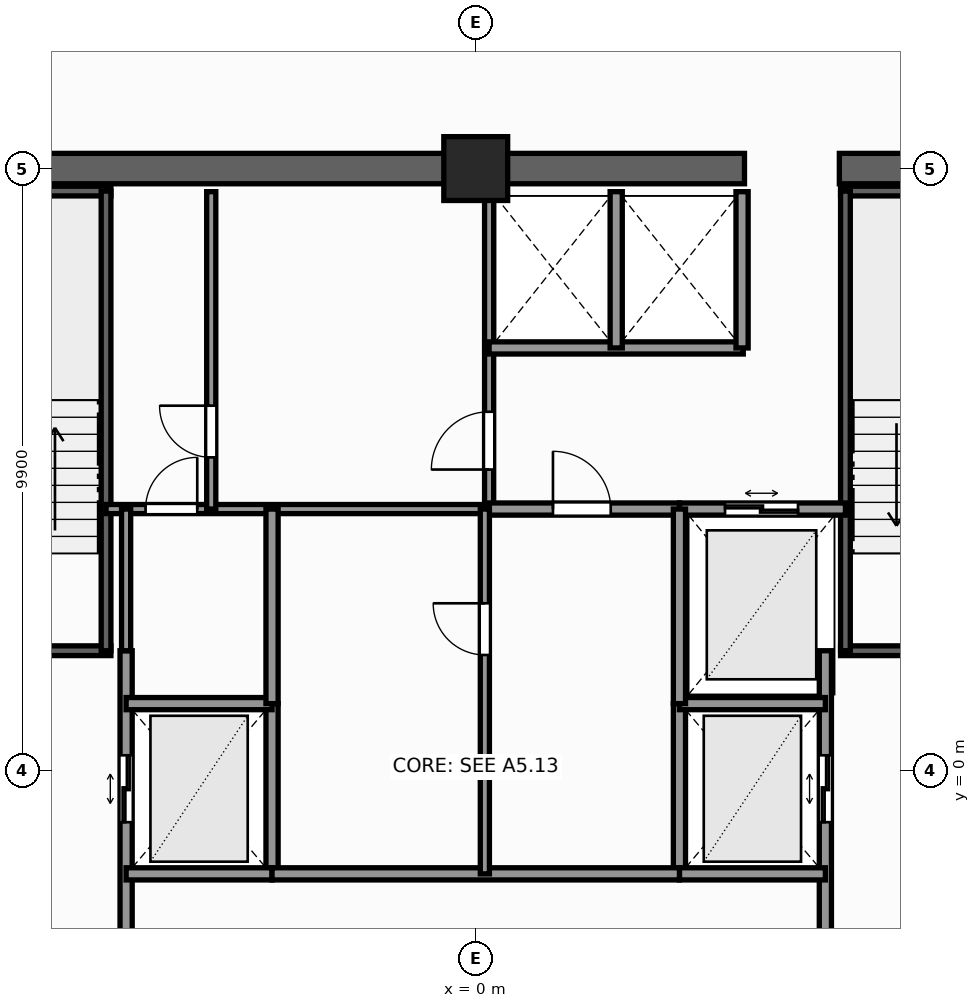
"""IFC4 building model, lengths in metres.
Left out: names, types, materials, properties, quantities, classifications, styles, units other than length and angle.
Written with IfcOpenShell. Run it as: python <this file> out.ifc"""

import sys

from ifc_helpers import new_model, si_unit, direction, frame, frame_2d, origin, origin_2d, place, context, subcontext, project, spatial, rectangle, extrude, element, fill, save


model = new_model("IFC4")
c1 = context("Model", 3, precision=1e-05, world=origin(), true_north=direction((0.0, 1.0)))
c2 = subcontext(c1, "Body", "Model", "MODEL_VIEW")
j1 = project(units=[si_unit("LENGTHUNIT", "METRE"), si_unit("PLANEANGLEUNIT", "RADIAN")], contexts=[c1])
p1 = place(None, origin())
s1 = spatial("IfcSite", under=j1, at=p1, CompositionType="ELEMENT")
p2 = place(p1, origin())
s2 = spatial("IfcBuilding", under=s1, at=p2, CompositionType="ELEMENT")
p3 = place(p2, frame((0.0, 0.0, 196.5)))
s3 = spatial("IfcBuildingStorey", under=s2, at=p3, CompositionType="ELEMENT", Elevation=196.5)
p4 = place(p3, frame((-10.15, 9.9, 0.0), z_axis=(0.0, 0.0, 1.0), x_axis=(1.0, 0.0, 0.0)))
e1 = element("IfcWall", 1, at=p4, inside=s3, PredefinedType="SHEAR", context=c2, shape_type="SweptSolid", body=[
    extrude(rectangle(XDim=14.57, YDim=0.5, at=frame_2d((7.285, 0.0))), origin(), (0.0, 0.0, 1.0), 3.3),
])
p5 = place(p3, frame((5.98, 9.9, 0.0), z_axis=(0.0, 0.0, 1.0), x_axis=(1.0, 0.0, 0.0)))
e2 = element("IfcWall", 2, at=p5, inside=s3, PredefinedType="SHEAR", context=c2, shape_type="SweptSolid", body=[
    extrude(rectangle(XDim=4.17, YDim=0.5, at=frame_2d((2.085, 0.0))), origin(), (0.0, 0.0, 1.0), 3.3),
])
p6 = place(p3, frame((0.0, 9.9, 0.0), z_axis=(0.0, 0.0, 1.0), x_axis=(1.0, 0.0, 0.0)))
e3 = element("IfcColumn", 3, at=p6, inside=s3, PredefinedType="COLUMN", context=c2, shape_type="SweptSolid", body=[
    extrude(rectangle(XDim=1.05, YDim=1.05, at=origin_2d()), origin(), (0.0, 0.0, 1.0), 3.3),
])
p7 = place(p3, frame((-9.52, 1.97, 0.0), z_axis=(0.0, 0.0, 1.0), x_axis=(1.0, 0.0, 0.0)))
e4 = element("IfcWall", 4, at=p7, inside=s3, PredefinedType="SHEAR", context=c2, shape_type="SweptSolid", body=[
    extrude(rectangle(XDim=3.52, YDim=0.16, at=frame_2d((1.76, 0.0))), origin(), (0.0, 0.0, 1.0), 3.3),
])
p8 = place(p7, frame((1.15, 0.0, 0.0)))
e5 = element("IfcOpeningElement", 5, at=p8, cuts=e4, PredefinedType="OPENING", context=c2, shape_type="SweptSolid", body=[
    extrude(rectangle(XDim=1.1, YDim=2.2, at=frame_2d((0.55, 1.1))), frame((0.0, 0.09, 0.0), z_axis=(0.0, -1.0, 0.0), x_axis=(1.0, 0.0, 0.0)), (0.0, 0.0, 1.0), 0.18),
])
p9 = place(p3, frame((-9.52, 9.53, 0.0), z_axis=(0.0, 0.0, 1.0), x_axis=(1.0, 0.0, 0.0)))
e6 = element("IfcWall", 6, at=p9, inside=s3, PredefinedType="SHEAR", context=c2, shape_type="SweptSolid", body=[
    extrude(rectangle(XDim=3.52, YDim=0.16, at=frame_2d((1.76, 0.0))), origin(), (0.0, 0.0, 1.0), 3.3),
])
p10 = place(p3, frame((-6.08, 1.97, 0.0), z_axis=(0.0, 0.0, 1.0), x_axis=(0.0, 1.0, 0.0)))
e7 = element("IfcWall", 7, at=p10, inside=s3, PredefinedType="SHEAR", context=c2, shape_type="SweptSolid", body=[
    extrude(rectangle(XDim=7.56, YDim=0.16, at=frame_2d((3.78, 0.0))), origin(), (0.0, 0.0, 1.0), 3.3),
])
p11 = place(p3, frame((6.0, 1.97, 0.0), z_axis=(0.0, 0.0, 1.0), x_axis=(1.0, 0.0, 0.0)))
e8 = element("IfcWall", 8, at=p11, inside=s3, PredefinedType="SHEAR", context=c2, shape_type="SweptSolid", body=[
    extrude(rectangle(XDim=3.52, YDim=0.16, at=frame_2d((1.76, 0.0))), origin(), (0.0, 0.0, 1.0), 3.3),
])
p12 = place(p11, frame((1.15, 0.0, 0.0)))
e9 = element("IfcOpeningElement", 9, at=p12, cuts=e8, PredefinedType="OPENING", context=c2, shape_type="SweptSolid", body=[
    extrude(rectangle(XDim=1.1, YDim=2.2, at=frame_2d((0.55, 1.1))), frame((0.0, 0.09, 0.0), z_axis=(0.0, -1.0, 0.0), x_axis=(1.0, 0.0, 0.0)), (0.0, 0.0, 1.0), 0.18),
])
p13 = place(p3, frame((6.0, 9.53, 0.0), z_axis=(0.0, 0.0, 1.0), x_axis=(1.0, 0.0, 0.0)))
e10 = element("IfcWall", 10, at=p13, inside=s3, PredefinedType="SHEAR", context=c2, shape_type="SweptSolid", body=[
    extrude(rectangle(XDim=3.52, YDim=0.16, at=frame_2d((1.76, 0.0))), origin(), (0.0, 0.0, 1.0), 3.3),
])
p14 = place(p3, frame((6.08, 1.97, 0.0), z_axis=(0.0, 0.0, 1.0), x_axis=(0.0, 1.0, 0.0)))
e11 = element("IfcWall", 11, at=p14, inside=s3, PredefinedType="SHEAR", context=c2, shape_type="SweptSolid", body=[
    extrude(rectangle(XDim=7.56, YDim=0.16, at=frame_2d((3.78, 0.0))), origin(), (0.0, 0.0, 1.0), 3.3),
])
p15 = place(p3, frame((-5.75, -3.6, 0.0), z_axis=(0.0, 0.0, 1.0), x_axis=(0.0, 1.0, 0.0)))
e12 = element("IfcWall", 12, at=p15, inside=s3, PredefinedType="SOLIDWALL", context=c2, shape_type="SweptSolid", body=[
    extrude(rectangle(XDim=5.57, YDim=0.2, at=frame_2d((2.785, 0.0))), origin(), (0.0, 0.0, 1.0), 3.08),
])
p16 = place(p15, frame((2.75, 0.0, 0.0)))
e13 = element("IfcOpeningElement", 13, at=p16, cuts=e12, PredefinedType="OPENING", context=c2, shape_type="SweptSolid", body=[
    extrude(rectangle(XDim=1.1, YDim=2.2, at=frame_2d((0.55, 1.1))), frame((0.0, 0.11, 0.0), z_axis=(0.0, -1.0, 0.0), x_axis=(1.0, 0.0, 0.0)), (0.0, 0.0, 1.0), 0.22),
])
p17 = place(p3, frame((-3.35, -1.7, 0.0), z_axis=(0.0, 0.0, 1.0), x_axis=(0.0, 1.0, 0.0)))
e14 = element("IfcWall", 14, at=p17, inside=s3, PredefinedType="SOLIDWALL", context=c2, shape_type="SweptSolid", body=[
    extrude(rectangle(XDim=2.8, YDim=0.2, at=frame_2d((1.4, 0.0))), origin(), (0.0, 0.0, 1.0), 3.08),
])
for number, where, z_axis, x_axis in (
    (15, (-5.75, -1.7, 0.0), (0.0, 0.0, 1.0), (1.0, 0.0, 0.0)),
    (16, (-5.75, 1.1, 0.0), (0.0, 0.0, 1.0), (1.0, 0.0, 0.0)),
):
    element("IfcWall", number, at=place(p3, frame(where, z_axis=z_axis, x_axis=x_axis)), inside=s3, PredefinedType="SOLIDWALL", context=c2, shape_type="SweptSolid", body=[
        extrude(rectangle(XDim=2.4, YDim=0.2, at=frame_2d((1.2, 0.0))), origin(), (0.0, 0.0, 1.0), 3.08),
    ])
p18 = place(p3, frame((5.75, -3.6, 0.0), z_axis=(0.0, 0.0, 1.0), x_axis=(0.0, 1.0, 0.0)))
e17 = element("IfcWall", 17, at=p18, inside=s3, PredefinedType="SOLIDWALL", context=c2, shape_type="SweptSolid", body=[
    extrude(rectangle(XDim=5.57, YDim=0.2, at=frame_2d((2.785, 0.0))), origin(), (0.0, 0.0, 1.0), 3.08),
])
p19 = place(p18, frame((2.75, 0.0, 0.0)))
e18 = element("IfcOpeningElement", 18, at=p19, cuts=e17, PredefinedType="OPENING", context=c2, shape_type="SweptSolid", body=[
    extrude(rectangle(XDim=1.1, YDim=2.2, at=frame_2d((0.55, 1.1))), frame((0.0, 0.11, 0.0), z_axis=(0.0, -1.0, 0.0), x_axis=(1.0, 0.0, 0.0)), (0.0, 0.0, 1.0), 0.22),
])
p20 = place(p3, frame((3.35, -1.7, 0.0), z_axis=(0.0, 0.0, 1.0), x_axis=(0.0, 1.0, 0.0)))
e19 = element("IfcWall", 19, at=p20, inside=s3, PredefinedType="SOLIDWALL", context=c2, shape_type="SweptSolid", body=[
    extrude(rectangle(XDim=2.8, YDim=0.2, at=frame_2d((1.4, 0.0))), origin(), (0.0, 0.0, 1.0), 3.08),
])
for number, where, z_axis, x_axis in (
    (20, (3.35, -1.7, 0.0), (0.0, 0.0, 1.0), (1.0, 0.0, 0.0)),
    (21, (3.35, 1.1, 0.0), (0.0, 0.0, 1.0), (1.0, 0.0, 0.0)),
):
    element("IfcWall", number, at=place(p3, frame(where, z_axis=z_axis, x_axis=x_axis)), inside=s3, PredefinedType="SOLIDWALL", context=c2, shape_type="SweptSolid", body=[
        extrude(rectangle(XDim=2.4, YDim=0.2, at=frame_2d((1.2, 0.0))), origin(), (0.0, 0.0, 1.0), 3.08),
    ])
p21 = place(p3, frame((3.35, 4.3, 0.0), z_axis=(0.0, 0.0, 1.0), x_axis=(1.0, 0.0, 0.0)))
e22 = element("IfcWall", 22, at=p21, inside=s3, PredefinedType="SOLIDWALL", context=c2, shape_type="SweptSolid", body=[
    extrude(rectangle(XDim=2.73, YDim=0.2, at=frame_2d((1.365, 0.0))), origin(), (0.0, 0.0, 1.0), 3.08),
])
p22 = place(p21, frame((0.75, 0.0, 0.0)))
e23 = element("IfcOpeningElement", 23, at=p22, cuts=e22, PredefinedType="OPENING", context=c2, shape_type="SweptSolid", body=[
    extrude(rectangle(XDim=1.2, YDim=2.25, at=frame_2d((0.6, 1.125))), frame((0.0, 0.11, 0.0), z_axis=(0.0, -1.0, 0.0), x_axis=(1.0, 0.0, 0.0)), (0.0, 0.0, 1.0), 0.22),
])
p23 = place(p3, frame((-6.08, 4.3, 0.0), z_axis=(0.0, 0.0, 1.0), x_axis=(1.0, 0.0, 0.0)))
e24 = element("IfcWall", 24, at=p23, inside=s3, PredefinedType="PARTITIONING", context=c2, shape_type="SweptSolid", body=[
    extrude(rectangle(XDim=6.3, YDim=0.15, at=frame_2d((3.15, 0.0))), origin(), (0.0, 0.0, 1.0), 3.08),
])
p24 = place(p23, frame((0.65, 0.0, 0.0)))
e25 = element("IfcOpeningElement", 25, at=p24, cuts=e24, PredefinedType="OPENING", context=c2, shape_type="SweptSolid", body=[
    extrude(rectangle(XDim=0.85, YDim=2.03, at=frame_2d((0.425, 1.015))), frame((0.0, 0.085, 0.0), z_axis=(0.0, -1.0, 0.0), x_axis=(1.0, 0.0, 0.0)), (0.0, 0.0, 1.0), 0.17),
])
p25 = place(p3, frame((0.22, 4.3, 0.0), z_axis=(0.0, 0.0, 1.0), x_axis=(0.0, 1.0, 0.0)))
e26 = element("IfcWall", 26, at=p25, inside=s3, PredefinedType="PARTITIONING", context=c2, shape_type="SweptSolid", body=[
    extrude(rectangle(XDim=5.22, YDim=0.15, at=frame_2d((2.61, 0.0))), origin(), (0.0, 0.0, 1.0), 3.08),
])
p26 = place(p25, frame((0.65, 0.0, 0.0)))
e27 = element("IfcOpeningElement", 27, at=p26, cuts=e26, PredefinedType="OPENING", context=c2, shape_type="SweptSolid", body=[
    extrude(rectangle(XDim=0.95, YDim=2.06, at=frame_2d((0.475, 1.03))), frame((0.0, 0.085, 0.0), z_axis=(0.0, -1.0, 0.0), x_axis=(1.0, 0.0, 0.0)), (0.0, 0.0, 1.0), 0.17),
])
p27 = place(p3, frame((-4.35, 4.3, 0.0), z_axis=(0.0, 0.0, 1.0), x_axis=(0.0, 1.0, 0.0)))
e28 = element("IfcWall", 28, at=p27, inside=s3, PredefinedType="PARTITIONING", context=c2, shape_type="SweptSolid", body=[
    extrude(rectangle(XDim=5.22, YDim=0.15, at=frame_2d((2.61, 0.0))), origin(), (0.0, 0.0, 1.0), 3.08),
])
p28 = place(p27, frame((0.85, 0.0, 0.0)))
e29 = element("IfcOpeningElement", 29, at=p28, cuts=e28, PredefinedType="OPENING", context=c2, shape_type="SweptSolid", body=[
    extrude(rectangle(XDim=0.85, YDim=2.03, at=frame_2d((0.425, 1.015))), frame((0.0, 0.085, 0.0), z_axis=(0.0, -1.0, 0.0), x_axis=(1.0, 0.0, 0.0)), (0.0, 0.0, 1.0), 0.17),
])
p29 = place(p3, frame((0.22, 6.95, 0.0), z_axis=(0.0, 0.0, 1.0), x_axis=(1.0, 0.0, 0.0)))
e30 = element("IfcWall", 30, at=p29, inside=s3, PredefinedType="SOLIDWALL", context=c2, shape_type="SweptSolid", body=[
    extrude(rectangle(XDim=4.18, YDim=0.2, at=frame_2d((2.09, 0.0))), origin(), (0.0, 0.0, 1.0), 3.08),
])
for number, where, z_axis, x_axis in (
    (31, (4.38, 6.95, 0.0), (0.0, 0.0, 1.0), (0.0, 1.0, 0.0)),
    (32, (2.31, 6.95, 0.0), (0.0, 0.0, 1.0), (0.0, 1.0, 0.0)),
):
    element("IfcWall", number, at=place(p3, frame(where, z_axis=z_axis, x_axis=x_axis)), inside=s3, PredefinedType="SOLIDWALL", context=c2, shape_type="SweptSolid", body=[
        extrude(rectangle(XDim=2.57, YDim=0.2, at=frame_2d((1.285, 0.0))), origin(), (0.0, 0.0, 1.0), 3.08),
    ])
p30 = place(p3, frame((0.22, 4.3, 0.0), z_axis=(0.0, 0.0, 1.0), x_axis=(1.0, 0.0, 0.0)))
e33 = element("IfcWall", 33, at=p30, inside=s3, PredefinedType="SOLIDWALL", context=c2, shape_type="SweptSolid", body=[
    extrude(rectangle(XDim=3.13, YDim=0.2, at=frame_2d((1.565, 0.0))), origin(), (0.0, 0.0, 1.0), 3.08),
])
p31 = place(p30, frame((1.05, 0.0, 0.0)))
e34 = element("IfcOpeningElement", 34, at=p31, cuts=e33, PredefinedType="OPENING", context=c2, shape_type="SweptSolid", body=[
    extrude(rectangle(XDim=0.95, YDim=2.06, at=frame_2d((0.475, 1.03))), frame((0.0, 0.11, 0.0), z_axis=(0.0, -1.0, 0.0), x_axis=(1.0, 0.0, 0.0)), (0.0, 0.0, 1.0), 0.22),
])
p32 = place(p3, frame((-3.35, -1.7, 0.0), z_axis=(0.0, 0.0, 1.0), x_axis=(1.0, 0.0, 0.0)))
e35 = element("IfcWall", 35, at=p32, inside=s3, PredefinedType="SOLIDWALL", context=c2, shape_type="SweptSolid", body=[
    extrude(rectangle(XDim=6.7, YDim=0.2, at=frame_2d((3.35, 0.0))), origin(), (0.0, 0.0, 1.0), 3.08),
])
for number, where, z_axis, x_axis in (
    (36, (-3.35, 1.1, 0.0), (0.0, 0.0, 1.0), (0.0, 1.0, 0.0)),
    (37, (3.35, 1.1, 0.0), (0.0, 0.0, 1.0), (0.0, 1.0, 0.0)),
):
    element("IfcWall", number, at=place(p3, frame(where, z_axis=z_axis, x_axis=x_axis)), inside=s3, PredefinedType="SOLIDWALL", context=c2, shape_type="SweptSolid", body=[
        extrude(rectangle(XDim=3.2, YDim=0.2, at=frame_2d((1.6, 0.0))), origin(), (0.0, 0.0, 1.0), 3.08),
    ])
p33 = place(p3, frame((0.15, -1.7, 0.0), z_axis=(0.0, 0.0, 1.0), x_axis=(0.0, 1.0, 0.0)))
e38 = element("IfcWall", 38, at=p33, inside=s3, PredefinedType="PARTITIONING", context=c2, shape_type="SweptSolid", body=[
    extrude(rectangle(XDim=6.0, YDim=0.15, at=frame_2d((3.0, 0.0))), origin(), (0.0, 0.0, 1.0), 3.08),
])
p34 = place(p33, frame((3.6, 0.0, 0.0)))
e39 = element("IfcOpeningElement", 39, at=p34, cuts=e38, PredefinedType="OPENING", context=c2, shape_type="SweptSolid", body=[
    extrude(rectangle(XDim=0.85, YDim=2.03, at=frame_2d((0.425, 1.015))), frame((0.0, 0.085, 0.0), z_axis=(0.0, -1.0, 0.0), x_axis=(1.0, 0.0, 0.0)), (0.0, 0.0, 1.0), 0.17),
])
p35 = place(p3, frame((-5.75, 1.97, 0.0), z_axis=(0.0, 0.0, 1.0), x_axis=(0.0, 1.0, 0.0)))
e40 = element("IfcWall", 40, at=p35, inside=s3, PredefinedType="PARTITIONING", context=c2, shape_type="SweptSolid", body=[
    extrude(rectangle(XDim=2.33, YDim=0.15, at=frame_2d((1.165, 0.0))), origin(), (0.0, 0.0, 1.0), 3.08),
])
p36 = place(p16, origin())
e41 = element("IfcDoor", 41, at=p36, inside=s3, OperationType="DOUBLE_DOOR_SLIDING", PredefinedType="DOOR", context=c2, shape_type="SweptSolid", body=[
    extrude(rectangle(XDim=1.1, YDim=2.2, at=frame_2d((0.55, 1.1))), frame((0.0, 0.025, 0.0), z_axis=(0.0, -1.0, 0.0), x_axis=(1.0, 0.0, 0.0)), (0.0, 0.0, 1.0), 0.05),
])
fill(e13, e41)
p37 = place(p19, origin())
e42 = element("IfcDoor", 42, at=p37, inside=s3, OperationType="DOUBLE_DOOR_SLIDING", PredefinedType="DOOR", context=c2, shape_type="SweptSolid", body=[
    extrude(rectangle(XDim=1.1, YDim=2.2, at=frame_2d((0.55, 1.1))), frame((0.0, 0.025, 0.0), z_axis=(0.0, -1.0, 0.0), x_axis=(1.0, 0.0, 0.0)), (0.0, 0.0, 1.0), 0.05),
])
fill(e18, e42)
p38 = place(p22, origin())
e43 = element("IfcDoor", 43, at=p38, inside=s3, OperationType="DOUBLE_DOOR_SLIDING", PredefinedType="DOOR", context=c2, shape_type="SweptSolid", body=[
    extrude(rectangle(XDim=1.2, YDim=2.25, at=frame_2d((0.6, 1.125))), frame((0.0, 0.025, 0.0), z_axis=(0.0, -1.0, 0.0), x_axis=(1.0, 0.0, 0.0)), (0.0, 0.0, 1.0), 0.05),
])
fill(e23, e43)
p39 = place(p26, origin())
e44 = element("IfcDoor", 44, at=p39, inside=s3, OperationType="SINGLE_SWING_LEFT", PredefinedType="DOOR", context=c2, shape_type="SweptSolid", body=[
    extrude(rectangle(XDim=0.95, YDim=2.06, at=frame_2d((0.475, 1.03))), frame((0.0, 0.025, 0.0), z_axis=(0.0, -1.0, 0.0), x_axis=(1.0, 0.0, 0.0)), (0.0, 0.0, 1.0), 0.05),
])
fill(e27, e44)
p40 = place(p28, origin())
e45 = element("IfcDoor", 45, at=p40, inside=s3, OperationType="SINGLE_SWING_RIGHT", PredefinedType="DOOR", context=c2, shape_type="SweptSolid", body=[
    extrude(rectangle(XDim=0.85, YDim=2.03, at=frame_2d((0.425, 1.015))), frame((0.0, 0.025, 0.0), z_axis=(0.0, -1.0, 0.0), x_axis=(1.0, 0.0, 0.0)), (0.0, 0.0, 1.0), 0.05),
])
fill(e29, e45)
p41 = place(p31, origin())
e46 = element("IfcDoor", 46, at=p41, inside=s3, OperationType="SINGLE_SWING_LEFT", PredefinedType="DOOR", context=c2, shape_type="SweptSolid", body=[
    extrude(rectangle(XDim=0.95, YDim=2.06, at=frame_2d((0.475, 1.03))), frame((0.0, 0.025, 0.0), z_axis=(0.0, -1.0, 0.0), x_axis=(1.0, 0.0, 0.0)), (0.0, 0.0, 1.0), 0.05),
])
fill(e34, e46)
p42 = place(p34, origin())
e47 = element("IfcDoor", 47, at=p42, inside=s3, OperationType="SINGLE_SWING_RIGHT", PredefinedType="DOOR", context=c2, shape_type="SweptSolid", body=[
    extrude(rectangle(XDim=0.85, YDim=2.03, at=frame_2d((0.425, 1.015))), frame((0.0, 0.025, 0.0), z_axis=(0.0, -1.0, 0.0), x_axis=(1.0, 0.0, 0.0)), (0.0, 0.0, 1.0), 0.05),
])
fill(e39, e47)
p43 = place(p24, origin())
e48 = element("IfcDoor", 48, at=p43, inside=s3, OperationType="SINGLE_SWING_RIGHT", PredefinedType="DOOR", context=c2, shape_type="SweptSolid", body=[
    extrude(rectangle(XDim=0.85, YDim=2.03, at=frame_2d((0.425, 1.015))), frame((0.0, 0.025, 0.0), z_axis=(0.0, -1.0, 0.0), x_axis=(1.0, 0.0, 0.0)), (0.0, 0.0, 1.0), 0.05),
])
fill(e25, e48)
save(model, sys.argv[1])
